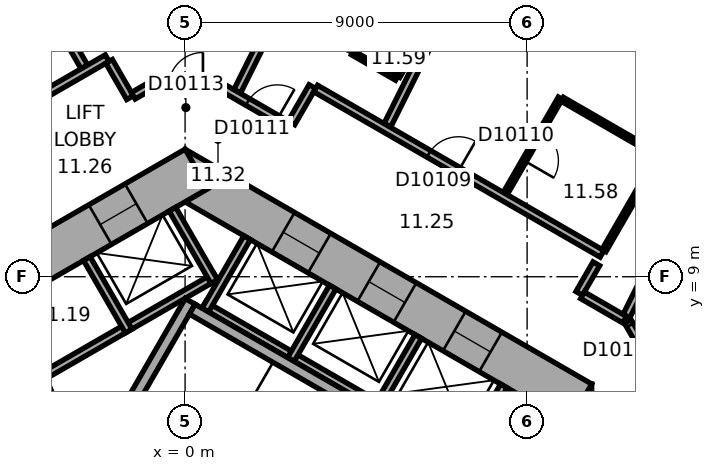
"""IFC4 building model, lengths in metres.
Left out: names, types, materials, properties, quantities, classifications, styles, units other than length and angle.
Written with IfcOpenShell. Run it as: python <this file> out.ifc"""

import sys

from ifc_helpers import new_model, si_unit, direction, frame, frame_2d, origin, place, context, subcontext, project, spatial, rectangle, extrude, element, fill, save


model = new_model("IFC4")
c1 = context("Model", 3, precision=1e-05, world=origin(), true_north=direction((0.0, 1.0)))
c2 = subcontext(c1, "Body", "Model", "MODEL_VIEW")
j1 = project(units=[si_unit("LENGTHUNIT", "METRE"), si_unit("PLANEANGLEUNIT", "RADIAN")], contexts=[c1])
p1 = place(None, origin())
s1 = spatial("IfcSite", under=j1, at=p1, CompositionType="ELEMENT")
p2 = place(p1, origin())
s2 = spatial("IfcBuilding", under=s1, at=p2, CompositionType="ELEMENT")
p3 = place(p2, frame((0.0, 0.0, 57.2)))
s3 = spatial("IfcBuildingStorey", under=s2, at=p3, CompositionType="ELEMENT", Elevation=57.2)
p4 = place(p3, frame((10.1, -6.177, 0.0), z_axis=(0.0, 0.0, 1.0), x_axis=(0.0, 1.0, 0.0)))
e1 = element("IfcWall", 1, at=p4, inside=s3, PredefinedType="SHEAR", context=c2, shape_type="SweptSolid", body=[
    extrude(rectangle(XDim=12.355, YDim=1.2, at=frame_2d((6.177, 0.0))), origin(), (0.0, 0.0, 1.0), 3.3),
])
p5 = place(p4, frame((6.378, 0.0, 0.0)))
e2 = element("IfcOpeningElement", 2, at=p5, cuts=e1, PredefinedType="OPENING", context=c2, shape_type="SweptSolid", body=[
    extrude(rectangle(XDim=1.5, YDim=2.1, at=frame_2d((0.75, 1.05))), frame((0.0, 0.61, 0.0), z_axis=(0.0, -1.0, 0.0), x_axis=(1.0, 0.0, 0.0)), (0.0, 0.0, 1.0), 1.22),
])
p6 = place(p4, frame((1.828, 0.0, 0.0)))
e3 = element("IfcOpeningElement", 3, at=p6, cuts=e1, PredefinedType="OPENING", context=c2, shape_type="SweptSolid", body=[
    extrude(rectangle(XDim=1.1, YDim=2.1, at=frame_2d((0.55, 1.05))), frame((0.0, 0.61, 0.0), z_axis=(0.0, -1.0, 0.0), x_axis=(1.0, 0.0, 0.0)), (0.0, 0.0, 1.0), 1.22),
])
p7 = place(p4, frame((4.427, 0.0, 0.0)))
e4 = element("IfcOpeningElement", 4, at=p7, cuts=e1, PredefinedType="OPENING", context=c2, shape_type="SweptSolid", body=[
    extrude(rectangle(XDim=1.1, YDim=2.1, at=frame_2d((0.55, 1.05))), frame((0.0, 0.61, 0.0), z_axis=(0.0, -1.0, 0.0), x_axis=(1.0, 0.0, 0.0)), (0.0, 0.0, 1.0), 1.22),
])
p8 = place(p3, frame((10.4, 5.658, 0.0), z_axis=(0.0, 0.0, 1.0), x_axis=(-0.866021384402, 0.500006961711, 0.0)))
e5 = element("IfcWall", 5, at=p8, inside=s3, PredefinedType="SHEAR", context=c2, shape_type="SweptSolid", body=[
    extrude(rectangle(XDim=12.355, YDim=1.2, at=frame_2d((6.178, 0.0))), origin(), (0.0, 0.0, 1.0), 3.3),
])
p9 = place(p8, frame((2.728, 0.0, 0.0)))
e6 = element("IfcOpeningElement", 6, at=p9, cuts=e5, PredefinedType="OPENING", context=c2, shape_type="SweptSolid", body=[
    extrude(rectangle(XDim=1.1, YDim=2.1, at=frame_2d((0.55, 1.05))), frame((0.0, 0.61, 0.0), z_axis=(0.0, -1.0, 0.0), x_axis=(1.0, 0.0, 0.0)), (0.0, 0.0, 1.0), 1.22),
])
p10 = place(p8, frame((5.328, 0.0, 0.0)))
e7 = element("IfcOpeningElement", 7, at=p10, cuts=e5, PredefinedType="OPENING", context=c2, shape_type="SweptSolid", body=[
    extrude(rectangle(XDim=1.1, YDim=2.1, at=frame_2d((0.55, 1.05))), frame((0.0, 0.61, 0.0), z_axis=(0.0, -1.0, 0.0), x_axis=(1.0, 0.0, 0.0)), (0.0, 0.0, 1.0), 1.22),
])
p11 = place(p8, frame((7.928, 0.0, 0.0)))
e8 = element("IfcOpeningElement", 8, at=p11, cuts=e5, PredefinedType="OPENING", context=c2, shape_type="SweptSolid", body=[
    extrude(rectangle(XDim=1.1, YDim=2.1, at=frame_2d((0.55, 1.05))), frame((0.0, 0.61, 0.0), z_axis=(0.0, -1.0, 0.0), x_axis=(1.0, 0.0, 0.0)), (0.0, 0.0, 1.0), 1.22),
])
p12 = place(p3, frame((0.3, 11.836, 0.0), z_axis=(0.0, 0.0, 1.0), x_axis=(-0.866021384402, -0.500006961711, 0.0)))
e9 = element("IfcWall", 9, at=p12, inside=s3, PredefinedType="SHEAR", context=c2, shape_type="SweptSolid", body=[
    extrude(rectangle(XDim=12.355, YDim=1.2, at=frame_2d((6.178, 0.0))), origin(), (0.0, 0.0, 1.0), 3.3),
])
p13 = place(p12, frame((6.378, 0.0, 0.0)))
e10 = element("IfcOpeningElement", 10, at=p13, cuts=e9, PredefinedType="OPENING", context=c2, shape_type="SweptSolid", body=[
    extrude(rectangle(XDim=1.5, YDim=2.1, at=frame_2d((0.75, 1.05))), frame((0.0, 0.61, 0.0), z_axis=(0.0, -1.0, 0.0), x_axis=(1.0, 0.0, 0.0)), (0.0, 0.0, 1.0), 1.22),
])
p14 = place(p12, frame((1.828, 0.0, 0.0)))
e11 = element("IfcOpeningElement", 11, at=p14, cuts=e9, PredefinedType="OPENING", context=c2, shape_type="SweptSolid", body=[
    extrude(rectangle(XDim=1.1, YDim=2.1, at=frame_2d((0.55, 1.05))), frame((0.0, 0.61, 0.0), z_axis=(0.0, -1.0, 0.0), x_axis=(1.0, 0.0, 0.0)), (0.0, 0.0, 1.0), 1.22),
])
p15 = place(p3, frame((-3.136, 24.805, 0.0), z_axis=(0.0, 0.0, 1.0), x_axis=(-0.866028291626, -0.499994998079, 0.0)))
e12 = element("IfcWall", 12, at=p15, inside=s3, PredefinedType="STANDARD", context=c2, shape_type="SweptSolid", body=[
    extrude(rectangle(XDim=21.246, YDim=0.2, at=frame_2d((10.623, 0.0))), origin(), (0.0, 0.0, 1.0), 3.3),
])
p16 = place(p15, frame((1.555, 0.0, 0.8)))
e13 = element("IfcOpeningElement", 13, at=p16, cuts=e12, PredefinedType="OPENING", context=c2, shape_type="SweptSolid", body=[
    extrude(rectangle(XDim=2.4, YDim=1.7, at=frame_2d((1.2, 0.85))), frame((0.0, 0.11, 0.0), z_axis=(0.0, -1.0, 0.0), x_axis=(1.0, 0.0, 0.0)), (0.0, 0.0, 1.0), 0.22),
])
p17 = place(p15, frame((5.489, 0.0, 0.8)))
e14 = element("IfcOpeningElement", 14, at=p17, cuts=e12, PredefinedType="OPENING", context=c2, shape_type="SweptSolid", body=[
    extrude(rectangle(XDim=2.4, YDim=1.7, at=frame_2d((1.2, 0.85))), frame((0.0, 0.11, 0.0), z_axis=(0.0, -1.0, 0.0), x_axis=(1.0, 0.0, 0.0)), (0.0, 0.0, 1.0), 0.22),
])
p18 = place(p15, frame((9.424, 0.0, 0.8)))
e15 = element("IfcOpeningElement", 15, at=p18, cuts=e12, PredefinedType="OPENING", context=c2, shape_type="SweptSolid", body=[
    extrude(rectangle(XDim=2.4, YDim=1.7, at=frame_2d((1.2, 0.85))), frame((0.0, 0.11, 0.0), z_axis=(0.0, -1.0, 0.0), x_axis=(1.0, 0.0, 0.0)), (0.0, 0.0, 1.0), 0.22),
])
p19 = place(p15, frame((13.358, 0.0, 0.8)))
e16 = element("IfcOpeningElement", 16, at=p19, cuts=e12, PredefinedType="OPENING", context=c2, shape_type="SweptSolid", body=[
    extrude(rectangle(XDim=2.4, YDim=1.7, at=frame_2d((1.2, 0.85))), frame((0.0, 0.11, 0.0), z_axis=(0.0, -1.0, 0.0), x_axis=(1.0, 0.0, 0.0)), (0.0, 0.0, 1.0), 0.22),
])
p20 = place(p15, frame((17.293, 0.0, 0.8)))
e17 = element("IfcOpeningElement", 17, at=p20, cuts=e12, PredefinedType="OPENING", context=c2, shape_type="SweptSolid", body=[
    extrude(rectangle(XDim=2.4, YDim=1.7, at=frame_2d((1.2, 0.85))), frame((0.0, 0.11, 0.0), z_axis=(0.0, -1.0, 0.0), x_axis=(1.0, 0.0, 0.0)), (0.0, 0.0, 1.0), 0.22),
])
p21 = place(p3, frame((7.424, 4.259, 0.0), z_axis=(0.0, 0.0, 1.0), x_axis=(-0.866026010844, 0.49999894854, 0.0)))
e18 = element("IfcWall", 18, at=p21, inside=s3, PredefinedType="PARTITIONING", context=c2, shape_type="SweptSolid", body=[
    extrude(rectangle(XDim=8.0, YDim=0.2, at=frame_2d((4.0, 0.0))), origin(), (0.0, 0.0, 1.0), 3.05),
])
for number, where, z_axis, x_axis in (
    (19, (7.287, 4.222, 0.0), (0.0, 0.0, 1.0), (0.5, 0.866, 0.0)),
    (20, (5.036, 5.522, 0.0), (0.0, 0.0, 1.0), (0.5, 0.866, 0.0)),
    (21, (2.784, 6.822, 0.0), (0.0, 0.0, 1.0), (0.5, 0.866, 0.0)),
    (22, (0.532, 8.122, 0.0), (0.0, 0.0, 1.0), (0.5, 0.866, 0.0)),
):
    element("IfcWall", number, at=place(p3, frame(where, z_axis=z_axis, x_axis=x_axis)), inside=s3, PredefinedType="PARTITIONING", context=c2, shape_type="SweptSolid", body=[
        extrude(rectangle(XDim=2.2, YDim=0.2, at=frame_2d((1.1, 0.0))), origin(), (0.0, 0.0, 1.0), 3.05),
    ])
p22 = place(p3, frame((0.803, 9.009, 0.0), z_axis=(0.0, 0.0, 1.0), x_axis=(-0.866028230842, -0.499995103361, 0.0)))
e23 = element("IfcWall", 23, at=p22, inside=s3, PredefinedType="PARTITIONING", context=c2, shape_type="SweptSolid", body=[
    extrude(rectangle(XDim=5.4, YDim=0.2, at=frame_2d((2.7, 0.0))), origin(), (0.0, 0.0, 1.0), 3.05),
])
p23 = place(p3, frame((0.767, 8.872, 0.0), z_axis=(0.0, 0.0, 1.0), x_axis=(-0.499994660107, 0.866028486751, 0.0)))
e24 = element("IfcWall", 24, at=p23, inside=s3, PredefinedType="PARTITIONING", context=c2, shape_type="SweptSolid", body=[
    extrude(rectangle(XDim=2.2, YDim=0.2, at=frame_2d((1.1, 0.0))), origin(), (0.0, 0.0, 1.0), 3.05),
])
p24 = place(p3, frame((-1.485, 7.572, 0.0), z_axis=(0.0, 0.0, 1.0), x_axis=(-0.50002983664, 0.866008176907, 0.0)))
e25 = element("IfcWall", 25, at=p24, inside=s3, PredefinedType="PARTITIONING", context=c2, shape_type="SweptSolid", body=[
    extrude(rectangle(XDim=2.2, YDim=0.2, at=frame_2d((1.1, 0.0))), origin(), (0.0, 0.0, 1.0), 3.05),
])
p25 = place(p3, frame((-2.216, 4.282, 0.0), z_axis=(0.0, 0.0, 1.0), x_axis=(0.499977259774, 0.866038532462, 0.0)))
e26 = element("IfcWall", 26, at=p25, inside=s3, PredefinedType="SHEAR", context=c2, shape_type="SweptSolid", body=[
    extrude(rectangle(XDim=4.7, YDim=0.3, at=frame_2d((2.35, 0.0))), origin(), (0.0, 0.0, 1.0), 3.05),
])
p26 = place(p3, frame((6.303, 4.617, 0.0), z_axis=(0.0, 0.0, 1.0), x_axis=(-0.866027801685, 0.499995846692, 0.0)))
e27 = element("IfcWall", 27, at=p26, inside=s3, PredefinedType="SHEAR", context=c2, shape_type="SweptSolid", body=[
    extrude(rectangle(XDim=7.06, YDim=0.3, at=frame_2d((3.53, 0.0))), origin(), (0.0, 0.0, 1.0), 3.05),
])
p27 = place(p3, frame((-2.615, 3.487, 0.0), z_axis=(0.0, 0.0, 1.0), x_axis=(-0.373576831041, 0.92759924068, 0.0)))
e28 = element("IfcWall", 28, at=p27, inside=s3, PredefinedType="PARTITIONING", context=c2, shape_type="SweptSolid", body=[
    extrude(rectangle(XDim=3.002, YDim=0.2, at=frame_2d((1.501, 0.0))), origin(), (0.0, 0.0, 1.0), 3.05),
])
p28 = place(p3, frame((-6.676, 21.492, 0.0), z_axis=(0.0, 0.0, 1.0), x_axis=(0.500011263043, -0.866018900966, 0.0)))
e29 = element("IfcWall", 29, at=p28, inside=s3, PredefinedType="PARTITIONING", context=c2, shape_type="SweptSolid", body=[
    extrude(rectangle(XDim=8.049, YDim=0.2, at=frame_2d((4.024, 0.0))), origin(), (0.0, 0.0, 1.0), 3.05),
])
p29 = place(p3, frame((-2.05, 14.752, 0.0), z_axis=(0.0, 0.0, 1.0), x_axis=(-0.866030936828, -0.499990416364, 0.0)))
e30 = element("IfcWall", 30, at=p29, inside=s3, PredefinedType="PARTITIONING", context=c2, shape_type="SweptSolid", body=[
    extrude(rectangle(XDim=3.102, YDim=0.2, at=frame_2d((1.551, 0.0))), origin(), (0.0, 0.0, 1.0), 3.05),
])
p30 = place(p3, frame((-1.449, 13.712, 0.0), z_axis=(0.0, 0.0, 1.0), x_axis=(-0.499978356969, 0.866037899034, 0.0)))
e31 = element("IfcWall", 31, at=p30, inside=s3, PredefinedType="PARTITIONING", context=c2, shape_type="SweptSolid", body=[
    extrude(rectangle(XDim=1.101, YDim=0.2, at=frame_2d((0.551, 0.0))), origin(), (0.0, 0.0, 1.0), 3.05),
])
p31 = place(p3, frame((-0.95, 14.001, 0.0), z_axis=(0.0, 0.0, 1.0), x_axis=(-0.86609177584, -0.499885022602, 0.0)))
e32 = element("IfcWall", 32, at=p31, inside=s3, PredefinedType="PARTITIONING", context=c2, shape_type="SweptSolid", body=[
    extrude(rectangle(XDim=0.477, YDim=0.2, at=frame_2d((0.238, 0.0))), origin(), (0.0, 0.0, 1.0), 3.05),
])
p32 = place(p3, frame((0.95, 14.001, 0.0), z_axis=(0.0, 0.0, 1.0), x_axis=(-1.0, 0.0, 0.0)))
e33 = element("IfcWall", 33, at=p32, inside=s3, PredefinedType="PARTITIONING", context=c2, shape_type="SweptSolid", body=[
    extrude(rectangle(XDim=1.86, YDim=0.2, at=frame_2d((0.93, 0.0))), origin(), (0.0, 0.0, 1.0), 3.05),
])
p33 = place(p32, frame((0.48, 0.0, 0.0)))
e34 = element("IfcOpeningElement", 34, at=p33, cuts=e33, PredefinedType="OPENING", context=c2, shape_type="SweptSolid", body=[
    extrude(rectangle(XDim=0.9, YDim=2.1, at=frame_2d((0.45, 1.05))), frame((0.0, 0.11, 0.0), z_axis=(0.0, -1.0, 0.0), x_axis=(1.0, 0.0, 0.0)), (0.0, 0.0, 1.0), 0.22),
])
p34 = place(p3, frame((2.748, 12.962, 0.0), z_axis=(0.0, 0.0, 1.0), x_axis=(-0.866013897511, 0.50001992892, 0.0)))
e35 = element("IfcWall", 35, at=p34, inside=s3, PredefinedType="PARTITIONING", context=c2, shape_type="SweptSolid", body=[
    extrude(rectangle(XDim=2.037, YDim=0.2, at=frame_2d((1.018, 0.0))), origin(), (0.0, 0.0, 1.0), 3.05),
])
p35 = place(p34, frame((0.372, 0.0, 0.0)))
e36 = element("IfcOpeningElement", 36, at=p35, cuts=e35, PredefinedType="OPENING", context=c2, shape_type="SweptSolid", body=[
    extrude(rectangle(XDim=0.9, YDim=2.1, at=frame_2d((0.45, 1.05))), frame((0.0, 0.11, 0.0), z_axis=(0.0, -1.0, 0.0), x_axis=(1.0, 0.0, 0.0)), (0.0, 0.0, 1.0), 0.22),
])
p36 = place(p3, frame((3.349, 14.002, 0.0), z_axis=(0.0, 0.0, 1.0), x_axis=(-0.500074377092, -0.865982457891, 0.0)))
e37 = element("IfcWall", 37, at=p36, inside=s3, PredefinedType="PARTITIONING", context=c2, shape_type="SweptSolid", body=[
    extrude(rectangle(XDim=1.101, YDim=0.2, at=frame_2d((0.55, 0.0))), origin(), (0.0, 0.0, 1.0), 3.05),
])
p37 = place(p3, frame((4.356, 14.922, 0.0), z_axis=(0.0, 0.0, 1.0), x_axis=(0.499936506574, 0.866062058628, 0.0)))
e38 = element("IfcWall", 38, at=p37, inside=s3, PredefinedType="PARTITIONING", context=c2, shape_type="SweptSolid", body=[
    extrude(rectangle(XDim=2.6, YDim=0.12, at=frame_2d((1.3, 0.0))), origin(), (0.0, 0.0, 1.0), 3.05),
])
p38 = place(p37, frame((0.85, 0.0, 0.0)))
e39 = element("IfcOpeningElement", 39, at=p38, cuts=e38, PredefinedType="OPENING", context=c2, shape_type="SweptSolid", body=[
    extrude(rectangle(XDim=0.9, YDim=2.1, at=frame_2d((0.45, 1.05))), frame((0.0, 0.07, 0.0), z_axis=(0.0, -1.0, 0.0), x_axis=(1.0, 0.0, 0.0)), (0.0, 0.0, 1.0), 0.14),
])
p39 = place(p3, frame((5.351, 21.859, 0.0), z_axis=(0.0, 0.0, 1.0), x_axis=(-0.446205309328, -0.894930624086, 0.0)))
e40 = element("IfcWall", 40, at=p39, inside=s3, PredefinedType="PARTITIONING", context=c2, shape_type="SweptSolid", body=[
    extrude(rectangle(XDim=8.913, YDim=0.2, at=frame_2d((4.457, 0.0))), origin(), (0.0, 0.0, 1.0), 2.6),
])
p40 = place(p3, frame((5.569, 14.222, 0.0), z_axis=(0.0, 0.0, 1.0), x_axis=(-0.866036909293, 0.499980071345, 0.0)))
e41 = element("IfcWall", 41, at=p40, inside=s3, PredefinedType="PARTITIONING", context=c2, shape_type="SweptSolid", body=[
    extrude(rectangle(XDim=1.34, YDim=0.12, at=frame_2d((0.67, 0.0))), origin(), (0.0, 0.0, 1.0), 3.05),
])
p41 = place(p3, frame((6.839, 16.422, 0.0), z_axis=(0.0, 0.0, 1.0), x_axis=(-0.50000366821, -0.866023285932, 0.0)))
e42 = element("IfcWall", 42, at=p41, inside=s3, PredefinedType="PARTITIONING", context=c2, shape_type="SweptSolid", body=[
    extrude(rectangle(XDim=2.48, YDim=0.12, at=frame_2d((1.24, 0.0))), origin(), (0.0, 0.0, 1.0), 3.05),
])
p42 = place(p3, frame((8.424, 11.188, 0.0), z_axis=(0.0, 0.0, 1.0), x_axis=(0.49995078051, 0.866053818805, 0.0)))
e43 = element("IfcWall", 43, at=p42, inside=s3, PredefinedType="PARTITIONING", context=c2, shape_type="SweptSolid", body=[
    extrude(rectangle(XDim=2.9, YDim=0.12, at=frame_2d((1.45, 0.0))), origin(), (0.0, 0.0, 1.0), 3.05),
])
p43 = place(p42, frame((1.0, 0.0, 0.0)))
e44 = element("IfcOpeningElement", 44, at=p43, cuts=e43, PredefinedType="OPENING", context=c2, shape_type="SweptSolid", body=[
    extrude(rectangle(XDim=0.9, YDim=2.1, at=frame_2d((0.45, 1.05))), frame((0.0, 0.07, 0.0), z_axis=(0.0, -1.0, 0.0), x_axis=(1.0, 0.0, 0.0)), (0.0, 0.0, 1.0), 0.14),
])
p44 = place(p3, frame((8.872, 20.104, 0.0), z_axis=(0.0, 0.0, 1.0), x_axis=(-0.446218378653, -0.894924107706, 0.0)))
e45 = element("IfcWall", 45, at=p44, inside=s3, PredefinedType="PARTITIONING", context=c2, shape_type="SweptSolid", body=[
    extrude(rectangle(XDim=7.95, YDim=0.2, at=frame_2d((3.975, 0.0))), origin(), (0.0, 0.0, 1.0), 3.05),
])
p45 = place(p3, frame((9.926, 13.67, 0.0), z_axis=(0.0, 0.0, 1.0), x_axis=(0.866032090307, -0.499988418424, 0.0)))
e46 = element("IfcWall", 46, at=p45, inside=s3, PredefinedType="PARTITIONING", context=c2, shape_type="SweptSolid", body=[
    extrude(rectangle(XDim=2.94, YDim=0.12, at=frame_2d((1.47, 0.0))), origin(), (0.0, 0.0, 1.0), 3.05),
])
p46 = place(p3, frame((10.371, 8.561, 0.0), z_axis=(0.0, 0.0, 1.0), x_axis=(0.50004290449, 0.866000631449, 0.0)))
e47 = element("IfcWall", 47, at=p46, inside=s3, PredefinedType="PARTITIONING", context=c2, shape_type="SweptSolid", body=[
    extrude(rectangle(XDim=0.901, YDim=0.2, at=frame_2d((0.451, 0.0))), origin(), (0.0, 0.0, 1.0), 3.05),
])
p47 = place(p3, frame((10.972, 9.602, 0.0), z_axis=(0.0, 0.0, 1.0), x_axis=(-0.866033277307, 0.499986362411, 0.0)))
e48 = element("IfcWall", 48, at=p47, inside=s3, PredefinedType="PARTITIONING", context=c2, shape_type="SweptSolid", body=[
    extrude(rectangle(XDim=8.702, YDim=0.2, at=frame_2d((4.351, 0.0))), origin(), (0.0, 0.0, 1.0), 3.05),
])
p48 = place(p47, frame((4.364, 0.0, 0.0)))
e49 = element("IfcOpeningElement", 49, at=p48, cuts=e48, PredefinedType="OPENING", context=c2, shape_type="SweptSolid", body=[
    extrude(rectangle(XDim=0.9, YDim=2.1, at=frame_2d((0.45, 1.05))), frame((0.0, 0.11, 0.0), z_axis=(0.0, -1.0, 0.0), x_axis=(1.0, 0.0, 0.0)), (0.0, 0.0, 1.0), 0.22),
])
p49 = place(p3, frame((11.566, 7.871, 0.0), z_axis=(0.0, 0.0, 1.0), x_axis=(-0.866004557827, 0.500036104519, 0.0)))
e50 = element("IfcWall", 50, at=p49, inside=s3, PredefinedType="PARTITIONING", context=c2, shape_type="SweptSolid", body=[
    extrude(rectangle(XDim=1.28, YDim=0.2, at=frame_2d((0.64, 0.0))), origin(), (0.0, 0.0, 1.0), 3.05),
])
p50 = place(p3, frame((12.442, 12.148, 0.0), z_axis=(0.0, 0.0, 1.0), x_axis=(-0.49994816717, -0.866055327414, 0.0)))
e51 = element("IfcWall", 51, at=p50, inside=s3, PredefinedType="PARTITIONING", context=c2, shape_type="SweptSolid", body=[
    extrude(rectangle(XDim=2.84, YDim=0.12, at=frame_2d((1.42, 0.0))), origin(), (0.0, 0.0, 1.0), 3.05),
])
p51 = place(p3, frame((12.58, 6.212, 0.0), z_axis=(0.0, 0.0, 1.0), x_axis=(-0.500063286585, 0.865988862174, 0.0)))
e52 = element("IfcWall", 52, at=p51, inside=s3, PredefinedType="PARTITIONING", context=c2, shape_type="SweptSolid", body=[
    extrude(rectangle(XDim=1.86, YDim=0.2, at=frame_2d((0.93, 0.0))), origin(), (0.0, 0.0, 1.0), 3.05),
])
p52 = place(p51, frame((0.842, 0.0, 0.0)))
e53 = element("IfcOpeningElement", 53, at=p52, cuts=e52, PredefinedType="OPENING", context=c2, shape_type="SweptSolid", body=[
    extrude(rectangle(XDim=0.9, YDim=2.1, at=frame_2d((0.45, 1.05))), frame((0.0, 0.11, 0.0), z_axis=(0.0, -1.0, 0.0), x_axis=(1.0, 0.0, 0.0)), (0.0, 0.0, 1.0), 0.22),
])
p53 = place(p3, frame((15.915, 16.592, 0.0), z_axis=(0.0, 0.0, 1.0), x_axis=(-0.446199736347, -0.894933402709, 0.0)))
e54 = element("IfcWall", 54, at=p53, inside=s3, PredefinedType="PARTITIONING", context=c2, shape_type="SweptSolid", body=[
    extrude(rectangle(XDim=9.635, YDim=0.2, at=frame_2d((4.817, 0.0))), origin(), (0.0, 0.0, 1.0), 3.05),
])
p54 = place(p9, origin())
e55 = element("IfcDoor", 55, at=p54, inside=s3, OperationType="DOUBLE_DOOR_SLIDING", PredefinedType="DOOR", context=c2, shape_type="SweptSolid", body=[
    extrude(rectangle(XDim=1.1, YDim=2.1, at=frame_2d((0.55, 1.05))), frame((0.0, 0.025, 0.0), z_axis=(0.0, -1.0, 0.0), x_axis=(1.0, 0.0, 0.0)), (0.0, 0.0, 1.0), 0.05),
])
fill(e6, e55)
p55 = place(p10, origin())
e56 = element("IfcDoor", 56, at=p55, inside=s3, OperationType="DOUBLE_DOOR_SLIDING", PredefinedType="DOOR", context=c2, shape_type="SweptSolid", body=[
    extrude(rectangle(XDim=1.1, YDim=2.1, at=frame_2d((0.55, 1.05))), frame((0.0, 0.025, 0.0), z_axis=(0.0, -1.0, 0.0), x_axis=(1.0, 0.0, 0.0)), (0.0, 0.0, 1.0), 0.05),
])
fill(e7, e56)
p56 = place(p11, origin())
e57 = element("IfcDoor", 57, at=p56, inside=s3, OperationType="DOUBLE_DOOR_SLIDING", PredefinedType="DOOR", context=c2, shape_type="SweptSolid", body=[
    extrude(rectangle(XDim=1.1, YDim=2.1, at=frame_2d((0.55, 1.05))), frame((0.0, 0.025, 0.0), z_axis=(0.0, -1.0, 0.0), x_axis=(1.0, 0.0, 0.0)), (0.0, 0.0, 1.0), 0.05),
])
fill(e8, e57)
p57 = place(p14, origin())
e58 = element("IfcDoor", 58, at=p57, inside=s3, OperationType="DOUBLE_DOOR_SLIDING", PredefinedType="DOOR", context=c2, shape_type="SweptSolid", body=[
    extrude(rectangle(XDim=1.1, YDim=2.1, at=frame_2d((0.55, 1.05))), frame((0.0, 0.025, 0.0), z_axis=(0.0, -1.0, 0.0), x_axis=(1.0, 0.0, 0.0)), (0.0, 0.0, 1.0), 0.05),
])
fill(e11, e58)
p58 = place(p52, origin())
e59 = element("IfcDoor", 59, at=p58, inside=s3, OperationType="SINGLE_SWING_LEFT", PredefinedType="DOOR", context=c2, shape_type="SweptSolid", body=[
    extrude(rectangle(XDim=0.9, YDim=2.1, at=frame_2d((0.45, 1.05))), frame((0.0, 0.025, 0.0), z_axis=(0.0, -1.0, 0.0), x_axis=(1.0, 0.0, 0.0)), (0.0, 0.0, 1.0), 0.05),
])
fill(e53, e59)
p59 = place(p48, origin())
e60 = element("IfcDoor", 60, at=p59, inside=s3, OperationType="SINGLE_SWING_LEFT", PredefinedType="DOOR", context=c2, shape_type="SweptSolid", body=[
    extrude(rectangle(XDim=0.9, YDim=2.1, at=frame_2d((0.45, 1.05))), frame((0.0, 0.025, 0.0), z_axis=(0.0, -1.0, 0.0), x_axis=(1.0, 0.0, 0.0)), (0.0, 0.0, 1.0), 0.05),
])
fill(e49, e60)
p60 = place(p43, origin())
e61 = element("IfcDoor", 61, at=p60, inside=s3, OperationType="SINGLE_SWING_LEFT", PredefinedType="DOOR", context=c2, shape_type="SweptSolid", body=[
    extrude(rectangle(XDim=0.9, YDim=2.1, at=frame_2d((0.45, 1.05))), frame((0.0, 0.025, 0.0), z_axis=(0.0, -1.0, 0.0), x_axis=(1.0, 0.0, 0.0)), (0.0, 0.0, 1.0), 0.05),
])
fill(e44, e61)
p61 = place(p35, origin())
e62 = element("IfcDoor", 62, at=p61, inside=s3, OperationType="SINGLE_SWING_LEFT", PredefinedType="DOOR", context=c2, shape_type="SweptSolid", body=[
    extrude(rectangle(XDim=0.9, YDim=2.1, at=frame_2d((0.45, 1.05))), frame((0.0, 0.025, 0.0), z_axis=(0.0, -1.0, 0.0), x_axis=(1.0, 0.0, 0.0)), (0.0, 0.0, 1.0), 0.05),
])
fill(e36, e62)
p62 = place(p33, origin())
e63 = element("IfcDoor", 63, at=p62, inside=s3, OperationType="SINGLE_SWING_LEFT", PredefinedType="DOOR", context=c2, shape_type="SweptSolid", body=[
    extrude(rectangle(XDim=0.9, YDim=2.1, at=frame_2d((0.45, 1.05))), frame((0.0, 0.025, 0.0), z_axis=(0.0, -1.0, 0.0), x_axis=(1.0, 0.0, 0.0)), (0.0, 0.0, 1.0), 0.05),
])
fill(e34, e63)
save(model, sys.argv[1])
